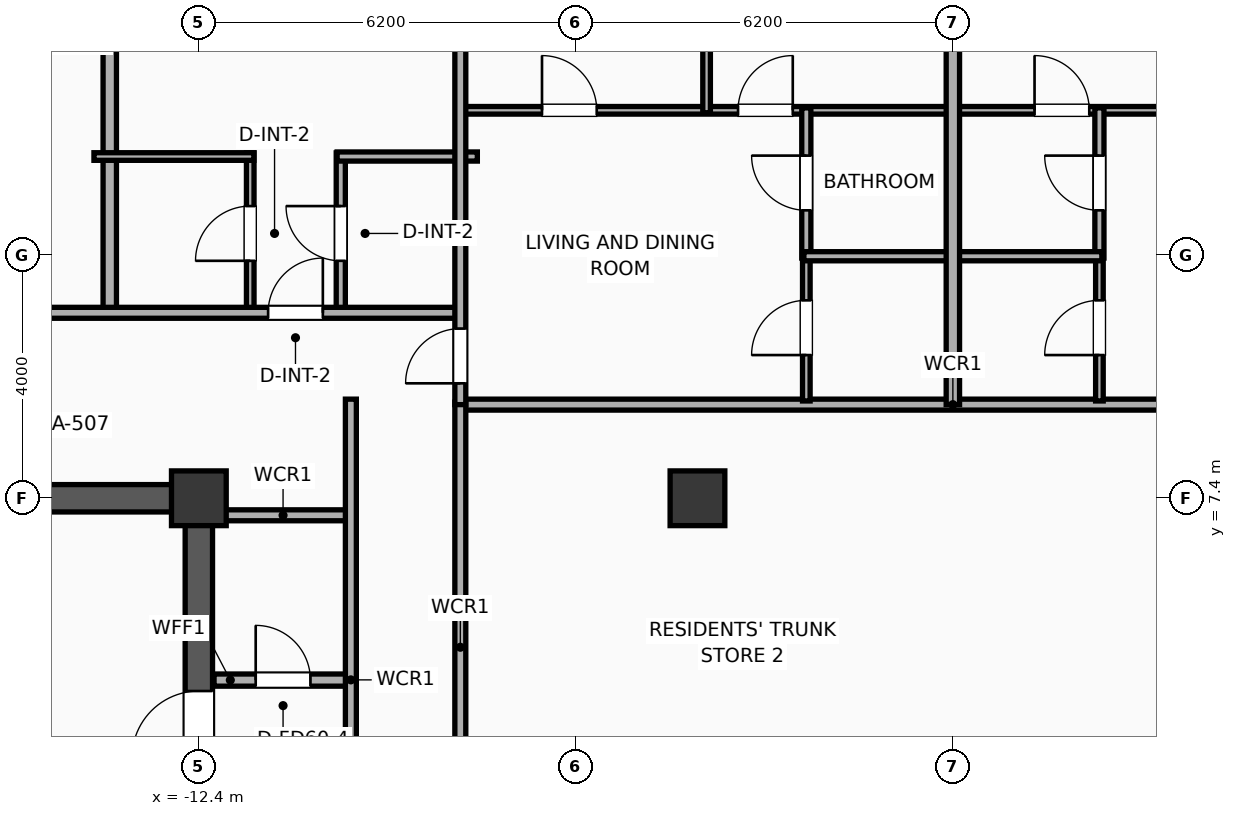
"""IFC4 building model, lengths in metres.
Left out: names, types, materials, properties, quantities, classifications, styles, units other than length and angle.
Written with IfcOpenShell. Run it as: python <this file> out.ifc"""

import sys

from ifc_helpers import new_model, si_unit, direction, frame, frame_2d, origin, origin_2d, place, context, subcontext, project, spatial, rectangle, extrude, element, fill, save


model = new_model("IFC4")
c1 = context("Model", 3, precision=1e-05, world=origin(), true_north=direction((0.0, 1.0)))
c2 = subcontext(c1, "Body", "Model", "MODEL_VIEW")
j1 = project(units=[si_unit("LENGTHUNIT", "METRE"), si_unit("PLANEANGLEUNIT", "RADIAN")], contexts=[c1])
p1 = place(None, origin())
s1 = spatial("IfcSite", under=j1, at=p1, CompositionType="ELEMENT")
p2 = place(p1, origin())
s2 = spatial("IfcBuilding", under=s1, at=p2, CompositionType="ELEMENT")
p3 = place(p2, frame((0.0, 0.0, 159.9)))
s3 = spatial("IfcBuildingStorey", under=s2, at=p3, CompositionType="ELEMENT", Elevation=159.9)
p4 = place(p3, frame((-12.4, 7.4, 0.0), z_axis=(0.0, 0.0, 1.0), x_axis=(1.0, 0.0, 0.0)))
e1 = element("IfcColumn", 1, at=p4, inside=s3, PredefinedType="COLUMN", context=c2, shape_type="SweptSolid", body=[
    extrude(rectangle(XDim=0.9, YDim=0.9, at=origin_2d()), origin(), (0.0, 0.0, 1.0), 3.9),
])
p5 = place(p3, frame((-19.425, 7.4, 0.0), z_axis=(0.0, 0.0, 1.0), x_axis=(1.0, 0.0, 0.0)))
e2 = element("IfcWall", 2, at=p5, inside=s3, PredefinedType="SHEAR", context=c2, shape_type="SweptSolid", body=[
    extrude(rectangle(XDim=7.25, YDim=0.45, at=frame_2d((3.625, 0.0))), origin(), (0.0, 0.0, 1.0), 3.65),
])
p6 = place(p3, frame((-12.4, -7.4, 0.0), z_axis=(0.0, 0.0, 1.0), x_axis=(0.0, 1.0, 0.0)))
e3 = element("IfcWall", 3, at=p6, inside=s3, PredefinedType="SHEAR", context=c2, shape_type="SweptSolid", body=[
    extrude(rectangle(XDim=14.8, YDim=0.45, at=frame_2d((7.4, 0.0))), origin(), (0.0, 0.0, 1.0), 3.65),
])
p7 = place(p6, frame((6.05, 0.0, 0.0)))
e4 = element("IfcOpeningElement", 4, at=p7, cuts=e3, PredefinedType="OPENING", context=c2, shape_type="SweptSolid", body=[
    extrude(rectangle(XDim=1.1, YDim=2.05, at=frame_2d((0.55, 1.025))), frame((0.0, 0.235, 0.0), z_axis=(0.0, -1.0, 0.0), x_axis=(1.0, 0.0, 0.0)), (0.0, 0.0, 1.0), 0.47),
])
p8 = place(p6, frame((10.53, 0.0, 0.0)))
e5 = element("IfcOpeningElement", 5, at=p8, cuts=e3, PredefinedType="OPENING", context=c2, shape_type="SweptSolid", body=[
    extrude(rectangle(XDim=1.1, YDim=2.05, at=frame_2d((0.55, 1.025))), frame((0.0, 0.235, 0.0), z_axis=(0.0, -1.0, 0.0), x_axis=(1.0, 0.0, 0.0)), (0.0, 0.0, 1.0), 0.47),
])
p9 = place(p6, frame((2.25, 0.0, 0.0)))
e6 = element("IfcOpeningElement", 6, at=p9, cuts=e3, PredefinedType="OPENING", context=c2, shape_type="SweptSolid", body=[
    extrude(rectangle(XDim=0.9, YDim=2.05, at=frame_2d((0.45, 1.025))), frame((0.0, 0.235, 0.0), z_axis=(0.0, -1.0, 0.0), x_axis=(1.0, 0.0, 0.0)), (0.0, 0.0, 1.0), 0.47),
])
p10 = place(p3, frame((-4.2, 7.4, 0.0), z_axis=(0.0, 0.0, 1.0), x_axis=(1.0, 0.0, 0.0)))
e7 = element("IfcColumn", 7, at=p10, inside=s3, PredefinedType="COLUMN", context=c2, shape_type="SweptSolid", body=[
    extrude(rectangle(XDim=0.9, YDim=0.9, at=origin_2d()), origin(), (0.0, 0.0, 1.0), 3.9),
])
p11 = place(p3, frame((-12.15, 4.41, 0.0), z_axis=(0.0, 0.0, 1.0), x_axis=(1.0, 0.0, 0.0)))
e8 = element("IfcWall", 8, at=p11, inside=s3, PredefinedType="PARTITIONING", context=c2, shape_type="SweptSolid", body=[
    extrude(rectangle(XDim=2.27, YDim=0.2, at=frame_2d((1.135, 0.0))), origin(), (0.0, 0.0, 1.0), 3.65),
])
p12 = place(p11, frame((0.685, 0.0, 0.0)))
e9 = element("IfcOpeningElement", 9, at=p12, cuts=e8, PredefinedType="OPENING", context=c2, shape_type="SweptSolid", body=[
    extrude(rectangle(XDim=0.9, YDim=2.05, at=frame_2d((0.45, 1.025))), frame((0.0, 0.11, 0.0), z_axis=(0.0, -1.0, 0.0), x_axis=(1.0, 0.0, 0.0)), (0.0, 0.0, 1.0), 0.22),
])
p13 = place(p3, frame((-12.15, 7.12, 0.0), z_axis=(0.0, 0.0, 1.0), x_axis=(1.0, 0.0, 0.0)))
e10 = element("IfcWall", 10, at=p13, inside=s3, PredefinedType="PARTITIONING", context=c2, shape_type="SweptSolid", body=[
    extrude(rectangle(XDim=2.27, YDim=0.18, at=frame_2d((1.135, 0.0))), origin(), (0.0, 0.0, 1.0), 3.65),
])
p14 = place(p3, frame((-9.9, -9.03, 0.0), z_axis=(0.0, 0.0, 1.0), x_axis=(0.0, 1.0, 0.0)))
e11 = element("IfcWall", 11, at=p14, inside=s3, PredefinedType="PARTITIONING", context=c2, shape_type="SweptSolid", body=[
    extrude(rectangle(XDim=18.06, YDim=0.18, at=frame_2d((9.03, 0.0))), origin(), (0.0, 0.0, 1.0), 3.65),
])
p15 = place(p14, frame((7.577, 0.0, 0.0)))
e12 = element("IfcOpeningElement", 12, at=p15, cuts=e11, PredefinedType="OPENING", context=c2, shape_type="SweptSolid", body=[
    extrude(rectangle(XDim=1.1, YDim=2.05, at=frame_2d((0.55, 1.025))), frame((0.0, 0.1, 0.0), z_axis=(0.0, -1.0, 0.0), x_axis=(1.0, 0.0, 0.0)), (0.0, 0.0, 1.0), 0.2),
])
p16 = place(p3, frame((-8.15, 8.94, 0.0), z_axis=(0.0, 0.0, 1.0), x_axis=(1.0, 0.0, 0.0)))
e13 = element("IfcWall", 13, at=p16, inside=s3, PredefinedType="PARTITIONING", context=c2, shape_type="SweptSolid", body=[
    extrude(rectangle(XDim=16.3, YDim=0.18, at=frame_2d((8.15, 0.0))), origin(), (0.0, 0.0, 1.0), 3.65),
])
p17 = place(p3, frame((-8.1, 0.92, 0.0), z_axis=(0.0, 0.0, 1.0), x_axis=(0.0, 1.0, 0.0)))
e14 = element("IfcWall", 14, at=p17, inside=s3, PredefinedType="PARTITIONING", context=c2, shape_type="SweptSolid", body=[
    extrude(rectangle(XDim=8.06, YDim=0.18, at=frame_2d((4.03, 0.0))), origin(), (0.0, 0.0, 1.0), 3.65),
])
p18 = place(p3, frame((-13.865, 10.37, 0.0), z_axis=(0.0, 0.0, 1.0), x_axis=(0.0, 1.0, 0.0)))
e15 = element("IfcWall", 15, at=p18, inside=s3, PredefinedType="PARTITIONING", context=c2, shape_type="SweptSolid", body=[
    extrude(rectangle(XDim=8.25, YDim=0.22, at=frame_2d((4.125, 0.0))), origin(), (0.0, 0.0, 1.0), 3.65),
])
p19 = place(p3, frame((-11.555, 10.43, 0.0), z_axis=(0.0, 0.0, 1.0), x_axis=(0.0, 1.0, 0.0)))
e16 = element("IfcWall", 16, at=p19, inside=s3, PredefinedType="PARTITIONING", context=c2, shape_type="SweptSolid", body=[
    extrude(rectangle(XDim=2.65, YDim=0.125, at=frame_2d((1.325, 0.0))), origin(), (0.0, 0.0, 1.0), 3.04),
])
p20 = place(p19, frame((0.875, 0.0, 0.0)))
e17 = element("IfcOpeningElement", 17, at=p20, cuts=e16, PredefinedType="OPENING", context=c2, shape_type="SweptSolid", body=[
    extrude(rectangle(XDim=0.9, YDim=2.05, at=frame_2d((0.45, 1.025))), frame((0.0, 0.073, 0.0), z_axis=(0.0, -1.0, 0.0), x_axis=(1.0, 0.0, 0.0)), (0.0, 0.0, 1.0), 0.145),
])
p21 = place(p3, frame((-10.066, 10.43, 0.0), z_axis=(0.0, 0.0, 1.0), x_axis=(0.0, 1.0, 0.0)))
e18 = element("IfcWall", 18, at=p21, inside=s3, PredefinedType="PLUMBINGWALL", context=c2, shape_type="SweptSolid", body=[
    extrude(rectangle(XDim=2.65, YDim=0.15, at=frame_2d((1.325, 0.0))), origin(), (0.0, 0.0, 1.0), 3.65),
])
p22 = place(p21, frame((0.875, 0.0, 0.0)))
e19 = element("IfcOpeningElement", 19, at=p22, cuts=e18, PredefinedType="OPENING", context=c2, shape_type="SweptSolid", body=[
    extrude(rectangle(XDim=0.9, YDim=2.05, at=frame_2d((0.45, 1.025))), frame((0.0, 0.085, 0.0), z_axis=(0.0, -1.0, 0.0), x_axis=(1.0, 0.0, 0.0)), (0.0, 0.0, 1.0), 0.17),
])
p23 = place(p3, frame((-14.125, 13.02, 0.0), z_axis=(0.0, 0.0, 1.0), x_axis=(1.0, 0.0, 0.0)))
e20 = element("IfcWall", 20, at=p23, inside=s3, PredefinedType="PARTITIONING", context=c2, shape_type="SweptSolid", body=[
    extrude(rectangle(XDim=2.63, YDim=0.125, at=frame_2d((1.315, 0.0))), origin(), (0.0, 0.0, 1.0), 3.65),
])
p24 = place(p3, frame((-10.126, 13.02, 0.0), z_axis=(0.0, 0.0, 1.0), x_axis=(1.0, 0.0, 0.0)))
e21 = element("IfcWall", 21, at=p24, inside=s3, PredefinedType="PLUMBINGWALL", context=c2, shape_type="SweptSolid", body=[
    extrude(rectangle(XDim=2.306, YDim=0.15, at=frame_2d((1.153, 0.0))), origin(), (0.0, 0.0, 1.0), 3.65),
])
p25 = place(p3, frame((-19.75, 10.45, 0.0), z_axis=(0.0, 0.0, 1.0), x_axis=(1.0, 0.0, 0.0)))
e22 = element("IfcWall", 22, at=p25, inside=s3, PredefinedType="PARTITIONING", context=c2, shape_type="SweptSolid", body=[
    extrude(rectangle(XDim=11.67, YDim=0.18, at=frame_2d((5.835, 0.0))), origin(), (0.0, 0.0, 1.0), 3.65),
])
p26 = place(p25, frame((3.553, 0.0, 0.0)))
e23 = element("IfcOpeningElement", 23, at=p26, cuts=e22, PredefinedType="OPENING", context=c2, shape_type="SweptSolid", body=[
    extrude(rectangle(XDim=1.15, YDim=2.05, at=frame_2d((0.575, 1.025))), frame((0.0, 0.1, 0.0), z_axis=(0.0, -1.0, 0.0), x_axis=(1.0, 0.0, 0.0)), (0.0, 0.0, 1.0), 0.2),
])
p27 = place(p25, frame((8.489, 0.0, 0.0)))
e24 = element("IfcOpeningElement", 24, at=p27, cuts=e22, PredefinedType="OPENING", context=c2, shape_type="SweptSolid", body=[
    extrude(rectangle(XDim=0.9, YDim=2.05, at=frame_2d((0.45, 1.025))), frame((0.0, 0.1, 0.0), z_axis=(0.0, -1.0, 0.0), x_axis=(1.0, 0.0, 0.0)), (0.0, 0.0, 1.0), 0.2),
])
p28 = place(p3, frame((-8.08, 13.78, 0.0), z_axis=(0.0, 0.0, 1.0), x_axis=(1.0, 0.0, 0.0)))
e25 = element("IfcWall", 25, at=p28, inside=s3, PredefinedType="PARTITIONING", context=c2, shape_type="SweptSolid", body=[
    extrude(rectangle(XDim=8.06, YDim=0.125, at=frame_2d((4.03, 0.0))), origin(), (0.0, 0.0, 1.0), 3.65),
])
p29 = place(p28, frame((1.323, 0.0, 0.0)))
e26 = element("IfcOpeningElement", 26, at=p29, cuts=e25, PredefinedType="OPENING", context=c2, shape_type="SweptSolid", body=[
    extrude(rectangle(XDim=0.9, YDim=2.05, at=frame_2d((0.45, 1.025))), frame((0.0, 0.073, 0.0), z_axis=(0.0, -1.0, 0.0), x_axis=(1.0, 0.0, 0.0)), (0.0, 0.0, 1.0), 0.145),
])
p30 = place(p28, frame((4.547, 0.0, 0.0)))
e27 = element("IfcOpeningElement", 27, at=p30, cuts=e25, PredefinedType="OPENING", context=c2, shape_type="SweptSolid", body=[
    extrude(rectangle(XDim=0.9, YDim=2.05, at=frame_2d((0.45, 1.025))), frame((0.0, 0.073, 0.0), z_axis=(0.0, -1.0, 0.0), x_axis=(1.0, 0.0, 0.0)), (0.0, 0.0, 1.0), 0.145),
])
p31 = place(p3, frame((-2.41, 9.0, 0.0), z_axis=(0.0, 0.0, 1.0), x_axis=(0.0, 1.0, 0.0)))
e28 = element("IfcWall", 28, at=p31, inside=s3, PredefinedType="PARTITIONING", context=c2, shape_type="SweptSolid", body=[
    extrude(rectangle(XDim=2.41, YDim=0.125, at=frame_2d((1.205, 0.0))), origin(), (0.0, 0.0, 1.0), 3.65),
])
p32 = place(p31, frame((0.755, 0.0, 0.0)))
e29 = element("IfcOpeningElement", 29, at=p32, cuts=e28, PredefinedType="OPENING", context=c2, shape_type="SweptSolid", body=[
    extrude(rectangle(XDim=0.9, YDim=2.05, at=frame_2d((0.45, 1.025))), frame((0.0, 0.073, 0.0), z_axis=(0.0, -1.0, 0.0), x_axis=(1.0, 0.0, 0.0)), (0.0, 0.0, 1.0), 0.145),
])
p33 = place(p3, frame((-2.41, 11.35, 0.0), z_axis=(0.0, 0.0, 1.0), x_axis=(0.0, 1.0, 0.0)))
e30 = element("IfcWall", 30, at=p33, inside=s3, PredefinedType="PLUMBINGWALL", context=c2, shape_type="SweptSolid", body=[
    extrude(rectangle(XDim=2.47, YDim=0.15, at=frame_2d((1.235, 0.0))), origin(), (0.0, 0.0, 1.0), 3.04),
])
p34 = place(p33, frame((0.785, 0.0, 0.0)))
e31 = element("IfcOpeningElement", 31, at=p34, cuts=e30, PredefinedType="OPENING", context=c2, shape_type="SweptSolid", body=[
    extrude(rectangle(XDim=0.9, YDim=2.05, at=frame_2d((0.45, 1.025))), frame((0.0, 0.085, 0.0), z_axis=(0.0, -1.0, 0.0), x_axis=(1.0, 0.0, 0.0)), (0.0, 0.0, 1.0), 0.17),
])
p35 = place(p3, frame((-2.45, 11.38, 0.0), z_axis=(0.0, 0.0, 1.0), x_axis=(1.0, 0.0, 0.0)))
e32 = element("IfcWall", 32, at=p35, inside=s3, PredefinedType="PLUMBINGWALL", context=c2, shape_type="SweptSolid", body=[
    extrude(rectangle(XDim=2.43, YDim=0.15, at=frame_2d((1.215, 0.0))), origin(), (0.0, 0.0, 1.0), 3.65),
])
p36 = place(p3, frame((-4.05, 13.74, 0.0), z_axis=(0.0, 0.0, 1.0), x_axis=(0.0, 1.0, 0.0)))
e33 = element("IfcWall", 33, at=p36, inside=s3, PredefinedType="PARTITIONING", context=c2, shape_type="SweptSolid", body=[
    extrude(rectangle(XDim=5.912, YDim=0.125, at=frame_2d((2.956, 0.0))), origin(), (0.0, 0.0, 1.0), 3.65),
])
p37 = place(p3, frame((-8.1, 8.94, 0.0), z_axis=(0.0, 0.0, 1.0), x_axis=(0.0, 1.0, 0.0)))
e34 = element("IfcWall", 34, at=p37, inside=s3, PredefinedType="PARTITIONING", context=c2, shape_type="SweptSolid", body=[
    extrude(rectangle(XDim=10.286, YDim=0.18, at=frame_2d((5.143, 0.0))), origin(), (0.0, 0.0, 1.0), 3.65),
])
p38 = place(p37, frame((0.35, 0.0, 0.0)))
e35 = element("IfcOpeningElement", 35, at=p38, cuts=e34, PredefinedType="OPENING", context=c2, shape_type="SweptSolid", body=[
    extrude(rectangle(XDim=0.9, YDim=2.05, at=frame_2d((0.45, 1.025))), frame((0.0, 0.1, 0.0), z_axis=(0.0, -1.0, 0.0), x_axis=(1.0, 0.0, 0.0)), (0.0, 0.0, 1.0), 0.2),
])
p39 = place(p3, frame((0.02, 13.78, 0.0), z_axis=(0.0, 0.0, 1.0), x_axis=(1.0, 0.0, 0.0)))
e36 = element("IfcWall", 36, at=p39, inside=s3, PredefinedType="PARTITIONING", context=c2, shape_type="SweptSolid", body=[
    extrude(rectangle(XDim=8.06, YDim=0.125, at=frame_2d((4.03, 0.0))), origin(), (0.0, 0.0, 1.0), 3.65),
])
p40 = place(p39, frame((1.323, 0.0, 0.0)))
e37 = element("IfcOpeningElement", 37, at=p40, cuts=e36, PredefinedType="OPENING", context=c2, shape_type="SweptSolid", body=[
    extrude(rectangle(XDim=0.9, YDim=2.05, at=frame_2d((0.45, 1.025))), frame((0.0, 0.073, 0.0), z_axis=(0.0, -1.0, 0.0), x_axis=(1.0, 0.0, 0.0)), (0.0, 0.0, 1.0), 0.145),
])
p41 = place(p39, frame((5.837, 0.0, 0.0)))
e38 = element("IfcOpeningElement", 38, at=p41, cuts=e36, PredefinedType="OPENING", context=c2, shape_type="SweptSolid", body=[
    extrude(rectangle(XDim=0.9, YDim=2.05, at=frame_2d((0.45, 1.025))), frame((0.0, 0.073, 0.0), z_axis=(0.0, -1.0, 0.0), x_axis=(1.0, 0.0, 0.0)), (0.0, 0.0, 1.0), 0.145),
])
p42 = place(p3, frame((2.41, 9.0, 0.0), z_axis=(0.0, 0.0, 1.0), x_axis=(0.0, 1.0, 0.0)))
e39 = element("IfcWall", 39, at=p42, inside=s3, PredefinedType="PARTITIONING", context=c2, shape_type="SweptSolid", body=[
    extrude(rectangle(XDim=2.41, YDim=0.125, at=frame_2d((1.205, 0.0))), origin(), (0.0, 0.0, 1.0), 3.65),
])
p43 = place(p42, frame((0.755, 0.0, 0.0)))
e40 = element("IfcOpeningElement", 40, at=p43, cuts=e39, PredefinedType="OPENING", context=c2, shape_type="SweptSolid", body=[
    extrude(rectangle(XDim=0.9, YDim=2.05, at=frame_2d((0.45, 1.025))), frame((0.0, 0.073, 0.0), z_axis=(0.0, -1.0, 0.0), x_axis=(1.0, 0.0, 0.0)), (0.0, 0.0, 1.0), 0.145),
])
p44 = place(p3, frame((2.41, 11.35, 0.0), z_axis=(0.0, 0.0, 1.0), x_axis=(0.0, 1.0, 0.0)))
e41 = element("IfcWall", 41, at=p44, inside=s3, PredefinedType="PLUMBINGWALL", context=c2, shape_type="SweptSolid", body=[
    extrude(rectangle(XDim=2.47, YDim=0.15, at=frame_2d((1.235, 0.0))), origin(), (0.0, 0.0, 1.0), 3.65),
])
p45 = place(p44, frame((0.785, 0.0, 0.0)))
e42 = element("IfcOpeningElement", 42, at=p45, cuts=e41, PredefinedType="OPENING", context=c2, shape_type="SweptSolid", body=[
    extrude(rectangle(XDim=0.9, YDim=2.05, at=frame_2d((0.45, 1.025))), frame((0.0, 0.085, 0.0), z_axis=(0.0, -1.0, 0.0), x_axis=(1.0, 0.0, 0.0)), (0.0, 0.0, 1.0), 0.17),
])
p46 = place(p3, frame((0.02, 11.38, 0.0), z_axis=(0.0, 0.0, 1.0), x_axis=(1.0, 0.0, 0.0)))
e43 = element("IfcWall", 43, at=p46, inside=s3, PredefinedType="PLUMBINGWALL", context=c2, shape_type="SweptSolid", body=[
    extrude(rectangle(XDim=2.43, YDim=0.15, at=frame_2d((1.215, 0.0))), origin(), (0.0, 0.0, 1.0), 3.65),
])
p47 = place(p3, frame((0.0, 8.94, 0.0), z_axis=(0.0, 0.0, 1.0), x_axis=(0.0, 1.0, 0.0)))
e44 = element("IfcWall", 44, at=p47, inside=s3, PredefinedType="PARTITIONING", context=c2, shape_type="SweptSolid", body=[
    extrude(rectangle(XDim=11.138, YDim=0.22, at=frame_2d((5.569, 0.0))), origin(), (0.0, 0.0, 1.0), 3.04),
])
p48 = place(p12, origin())
e45 = element("IfcDoor", 45, at=p48, inside=s3, OperationType="SINGLE_SWING_LEFT", PredefinedType="DOOR", context=c2, shape_type="SweptSolid", body=[
    extrude(rectangle(XDim=0.9, YDim=2.05, at=frame_2d((0.45, 1.025))), frame((0.0, 0.025, 0.0), z_axis=(0.0, -1.0, 0.0), x_axis=(1.0, 0.0, 0.0)), (0.0, 0.0, 1.0), 0.05),
])
fill(e9, e45)
p49 = place(p20, origin())
e46 = element("IfcDoor", 46, at=p49, inside=s3, OperationType="SINGLE_SWING_LEFT", PredefinedType="DOOR", context=c2, shape_type="SweptSolid", body=[
    extrude(rectangle(XDim=0.9, YDim=2.05, at=frame_2d((0.45, 1.025))), frame((0.0, 0.025, 0.0), z_axis=(0.0, -1.0, 0.0), x_axis=(1.0, 0.0, 0.0)), (0.0, 0.0, 1.0), 0.05),
])
fill(e17, e46)
p50 = place(p22, origin())
e47 = element("IfcDoor", 47, at=p50, inside=s3, OperationType="SINGLE_SWING_RIGHT", PredefinedType="DOOR", context=c2, shape_type="SweptSolid", body=[
    extrude(rectangle(XDim=0.9, YDim=2.05, at=frame_2d((0.45, 1.025))), frame((0.0, 0.025, 0.0), z_axis=(0.0, -1.0, 0.0), x_axis=(1.0, 0.0, 0.0)), (0.0, 0.0, 1.0), 0.05),
])
fill(e19, e47)
p51 = place(p27, origin())
e48 = element("IfcDoor", 48, at=p51, inside=s3, OperationType="SINGLE_SWING_RIGHT", PredefinedType="DOOR", context=c2, shape_type="SweptSolid", body=[
    extrude(rectangle(XDim=0.9, YDim=2.05, at=frame_2d((0.45, 1.025))), frame((0.0, 0.025, 0.0), z_axis=(0.0, -1.0, 0.0), x_axis=(1.0, 0.0, 0.0)), (0.0, 0.0, 1.0), 0.05),
])
fill(e24, e48)
p52 = place(p29, origin())
e49 = element("IfcDoor", 49, at=p52, inside=s3, OperationType="SINGLE_SWING_LEFT", PredefinedType="DOOR", context=c2, shape_type="SweptSolid", body=[
    extrude(rectangle(XDim=0.9, YDim=2.05, at=frame_2d((0.45, 1.025))), frame((0.0, 0.025, 0.0), z_axis=(0.0, -1.0, 0.0), x_axis=(1.0, 0.0, 0.0)), (0.0, 0.0, 1.0), 0.05),
])
fill(e26, e49)
p53 = place(p30, origin())
e50 = element("IfcDoor", 50, at=p53, inside=s3, OperationType="SINGLE_SWING_RIGHT", PredefinedType="DOOR", context=c2, shape_type="SweptSolid", body=[
    extrude(rectangle(XDim=0.9, YDim=2.05, at=frame_2d((0.45, 1.025))), frame((0.0, 0.025, 0.0), z_axis=(0.0, -1.0, 0.0), x_axis=(1.0, 0.0, 0.0)), (0.0, 0.0, 1.0), 0.05),
])
fill(e27, e50)
p54 = place(p32, origin())
e51 = element("IfcDoor", 51, at=p54, inside=s3, OperationType="SINGLE_SWING_LEFT", PredefinedType="DOOR", context=c2, shape_type="SweptSolid", body=[
    extrude(rectangle(XDim=0.9, YDim=2.05, at=frame_2d((0.45, 1.025))), frame((0.0, 0.025, 0.0), z_axis=(0.0, -1.0, 0.0), x_axis=(1.0, 0.0, 0.0)), (0.0, 0.0, 1.0), 0.05),
])
fill(e29, e51)
p55 = place(p34, origin())
e52 = element("IfcDoor", 52, at=p55, inside=s3, OperationType="SINGLE_SWING_RIGHT", PredefinedType="DOOR", context=c2, shape_type="SweptSolid", body=[
    extrude(rectangle(XDim=0.9, YDim=2.05, at=frame_2d((0.45, 1.025))), frame((0.0, 0.025, 0.0), z_axis=(0.0, -1.0, 0.0), x_axis=(1.0, 0.0, 0.0)), (0.0, 0.0, 1.0), 0.05),
])
fill(e31, e52)
p56 = place(p38, origin())
e53 = element("IfcDoor", 53, at=p56, inside=s3, OperationType="SINGLE_SWING_LEFT", PredefinedType="DOOR", context=c2, shape_type="SweptSolid", body=[
    extrude(rectangle(XDim=0.9, YDim=2.05, at=frame_2d((0.45, 1.025))), frame((0.0, 0.025, 0.0), z_axis=(0.0, -1.0, 0.0), x_axis=(1.0, 0.0, 0.0)), (0.0, 0.0, 1.0), 0.05),
])
fill(e35, e53)
p57 = place(p40, origin())
e54 = element("IfcDoor", 54, at=p57, inside=s3, OperationType="SINGLE_SWING_LEFT", PredefinedType="DOOR", context=c2, shape_type="SweptSolid", body=[
    extrude(rectangle(XDim=0.9, YDim=2.05, at=frame_2d((0.45, 1.025))), frame((0.0, 0.025, 0.0), z_axis=(0.0, -1.0, 0.0), x_axis=(1.0, 0.0, 0.0)), (0.0, 0.0, 1.0), 0.05),
])
fill(e37, e54)
p58 = place(p43, origin())
e55 = element("IfcDoor", 55, at=p58, inside=s3, OperationType="SINGLE_SWING_LEFT", PredefinedType="DOOR", context=c2, shape_type="SweptSolid", body=[
    extrude(rectangle(XDim=0.9, YDim=2.05, at=frame_2d((0.45, 1.025))), frame((0.0, 0.025, 0.0), z_axis=(0.0, -1.0, 0.0), x_axis=(1.0, 0.0, 0.0)), (0.0, 0.0, 1.0), 0.05),
])
fill(e40, e55)
p59 = place(p45, origin())
e56 = element("IfcDoor", 56, at=p59, inside=s3, OperationType="SINGLE_SWING_RIGHT", PredefinedType="DOOR", context=c2, shape_type="SweptSolid", body=[
    extrude(rectangle(XDim=0.9, YDim=2.05, at=frame_2d((0.45, 1.025))), frame((0.0, 0.025, 0.0), z_axis=(0.0, -1.0, 0.0), x_axis=(1.0, 0.0, 0.0)), (0.0, 0.0, 1.0), 0.05),
])
fill(e42, e56)
p60 = place(p8, origin())
e57 = element("IfcDoor", 57, at=p60, inside=s3, OperationType="SINGLE_SWING_LEFT", PredefinedType="DOOR", context=c2, shape_type="SweptSolid", body=[
    extrude(rectangle(XDim=1.1, YDim=2.05, at=frame_2d((0.55, 1.025))), frame((0.0, 0.025, 0.0), z_axis=(0.0, -1.0, 0.0), x_axis=(1.0, 0.0, 0.0)), (0.0, 0.0, 1.0), 0.05),
])
fill(e5, e57)
save(model, sys.argv[1])
